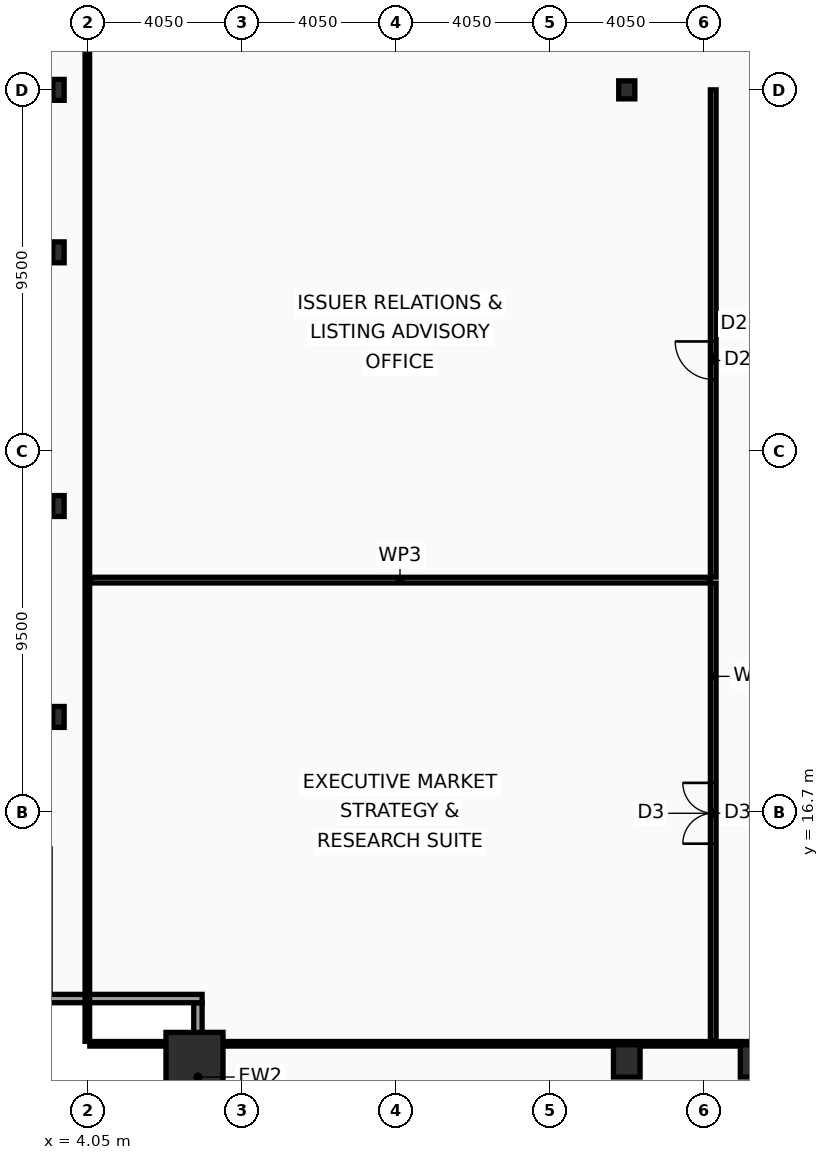
"""IFC4 building model, lengths in metres.
Left out: names, types, materials, properties, quantities, classifications, styles, units other than length and angle.
Written with IfcOpenShell. Run it as: python <this file> out.ifc"""

import sys

from ifc_helpers import new_model, si_unit, direction, frame, frame_2d, origin, origin_2d, place, context, subcontext, project, spatial, rectangle, hollow_rectangle, i_section, extrude, element, fill, save


model = new_model("IFC4")
c1 = context("Model", 3, precision=1e-05, world=origin(), true_north=direction((0.0, 1.0)))
c2 = subcontext(c1, "Body", "Model", "MODEL_VIEW")
j1 = project(units=[si_unit("LENGTHUNIT", "METRE"), si_unit("PLANEANGLEUNIT", "RADIAN")], contexts=[c1])
p1 = place(None, origin())
s1 = spatial("IfcSite", under=j1, at=p1, CompositionType="ELEMENT")
p2 = place(p1, origin())
s2 = spatial("IfcBuilding", under=s1, at=p2, CompositionType="ELEMENT")
p3 = place(p2, frame((0.0, 0.0, 106.6)))
s3 = spatial("IfcBuildingStorey", under=s2, at=p3, CompositionType="ELEMENT", Elevation=106.6)
p4 = place(p3, frame((6.85, 10.15, 0.0), z_axis=(0.0, 0.0, 1.0), x_axis=(1.0, 0.0, 0.0)))
e1 = element("IfcColumn", 1, at=p4, inside=s3, PredefinedType="COLUMN", context=c2, shape_type="SweptSolid", body=[
    extrude(hollow_rectangle(XDim=1.5, YDim=1.5, WallThickness=0.07, at=origin_2d()), origin(), (0.0, 0.0, 1.0), 4.4),
])
for number, where, z_axis, x_axis in (
    (2, (18.225, 10.15, 0.0), (0.0, 0.0, 1.0), (1.0, 0.0, 0.0)),
    (3, (21.562, 10.15, 0.0), (0.0, 0.0, 1.0), (1.0, 0.0, 0.0)),
):
    element("IfcColumn", number, at=place(p3, frame(where, z_axis=z_axis, x_axis=x_axis)), inside=s3, PredefinedType="COLUMN", context=c2, shape_type="SweptSolid", body=[
        extrude(hollow_rectangle(XDim=0.7, YDim=0.85, WallThickness=0.05, at=origin_2d()), origin(), (0.0, 0.0, 1.0), 4.4),
    ])
for number, where, z_axis, x_axis in (
    (4, (3.27, 19.2, 0.0), (0.0, 0.0, 1.0), (1.0, 0.0, 0.0)),
    (5, (3.27, 24.75, 0.0), (0.0, 0.0, 1.0), (1.0, 0.0, 0.0)),
    (6, (3.27, 31.425, 0.0), (0.0, 0.0, 1.0), (1.0, 0.0, 0.0)),
    (7, (3.27, 35.7, 0.0), (0.0, 0.0, 1.0), (1.0, 0.0, 0.0)),
):
    element("IfcColumn", number, at=place(p3, frame(where, z_axis=z_axis, x_axis=x_axis)), inside=s3, PredefinedType="COLUMN", context=c2, shape_type="SweptSolid", body=[
        extrude(i_section(OverallWidth=0.3, OverallDepth=0.55, WebThickness=0.015, FlangeThickness=0.029, at=origin_2d()), origin(), (0.0, 0.0, 1.0), 4.4),
    ])
p5 = place(p3, frame((18.225, 35.7, 0.0), z_axis=(0.0, 0.0, 1.0), x_axis=(1.0, 0.0, 0.0)))
e8 = element("IfcColumn", 8, at=p5, inside=s3, PredefinedType="COLUMN", context=c2, shape_type="SweptSolid", body=[
    extrude(i_section(OverallWidth=0.424, OverallDepth=0.474, WebThickness=0.048, FlangeThickness=0.077, at=origin_2d()), origin(), (0.0, 0.0, 1.0), 4.4),
])
p6 = place(p3, frame((6.94, 7.77, 0.0), z_axis=(0.0, 0.0, 1.0), x_axis=(0.0, 1.0, 0.0)))
e9 = element("IfcWall", 9, at=p6, inside=s3, PredefinedType="SOLIDWALL", context=c2, shape_type="SweptSolid", body=[
    extrude(rectangle(XDim=3.91, YDim=0.22, at=frame_2d((1.955, 0.0))), origin(), (0.0, 0.0, 1.0), 3.63),
])
p7 = place(p3, frame((7.05, 11.79, 0.0), z_axis=(0.0, 0.0, 1.0), x_axis=(-1.0, 0.0, 0.0)))
e10 = element("IfcWall", 10, at=p7, inside=s3, PredefinedType="SOLIDWALL", context=c2, shape_type="SweptSolid", body=[
    extrude(rectangle(XDim=4.22, YDim=0.22, at=frame_2d((2.11, 0.0))), origin(), (0.0, 0.0, 1.0), 3.63),
])
p8 = place(p3, frame((20.5, 10.665, 0.0), z_axis=(0.0, 0.0, 1.0), x_axis=(0.0, 1.0, 0.0)))
e11 = element("IfcWall", 11, at=p8, inside=s3, PredefinedType="PARTITIONING", context=c2, shape_type="SweptSolid", body=[
    extrude(rectangle(XDim=12.055, YDim=0.15, at=frame_2d((6.027, 0.0))), origin(), (0.0, 0.0, 1.0), 3.68),
])
p9 = place(p8, frame((5.2, 0.0, 0.0)))
e12 = element("IfcOpeningElement", 12, at=p9, cuts=e11, PredefinedType="OPENING", context=c2, shape_type="SweptSolid", body=[
    extrude(rectangle(XDim=1.6, YDim=2.15, at=frame_2d((0.8, 1.075))), frame((0.0, 0.085, 0.0), z_axis=(0.0, -1.0, 0.0), x_axis=(1.0, 0.0, 0.0)), (0.0, 0.0, 1.0), 0.17),
])
p10 = place(p3, frame((20.5, 22.88, 0.0), z_axis=(0.0, 0.0, 1.0), x_axis=(0.0, 1.0, 0.0)))
e13 = element("IfcWall", 13, at=p10, inside=s3, PredefinedType="PARTITIONING", context=c2, shape_type="SweptSolid", body=[
    extrude(rectangle(XDim=12.82, YDim=0.15, at=frame_2d((6.41, 0.0))), origin(), (0.0, 0.0, 1.0), 3.68),
])
p11 = place(p10, frame((5.2, 0.0, 0.0)))
e14 = element("IfcOpeningElement", 14, at=p11, cuts=e13, PredefinedType="OPENING", context=c2, shape_type="SweptSolid", body=[
    extrude(rectangle(XDim=1.0, YDim=2.05, at=frame_2d((0.5, 1.025))), frame((0.0, 0.085, 0.0), z_axis=(0.0, -1.0, 0.0), x_axis=(1.0, 0.0, 0.0)), (0.0, 0.0, 1.0), 0.17),
])
p12 = place(p3, frame((4.095, 22.8, 0.0), z_axis=(0.0, 0.0, 1.0), x_axis=(1.0, 0.0, 0.0)))
e15 = element("IfcWall", 15, at=p12, inside=s3, PredefinedType="PARTITIONING", context=c2, shape_type="SweptSolid", body=[
    extrude(rectangle(XDim=16.325, YDim=0.15, at=frame_2d((8.163, 0.0))), origin(), (0.0, 0.0, 1.0), 3.53),
])
p13 = place(p3, frame((4.03, 10.665, 0.0), z_axis=(0.0, 0.0, 1.0), x_axis=(0.0, 1.0, 0.0)))
e16 = element("IfcWall", 16, at=p13, inside=s3, PredefinedType="PARTITIONING", context=c2, shape_type="SweptSolid", body=[
    extrude(rectangle(XDim=42.11, YDim=0.12, at=frame_2d((21.055, 0.0))), origin(), (0.0, 0.0, 1.0), 3.53),
])
p14 = place(p3, frame((4.095, 10.6, 0.0), z_axis=(0.0, 0.0, 1.0), x_axis=(1.0, 0.0, 0.0)))
e17 = element("IfcWall", 17, at=p14, inside=s3, PredefinedType="PARTITIONING", context=c2, shape_type="SweptSolid", body=[
    extrude(rectangle(XDim=64.71, YDim=0.12, at=frame_2d((32.355, 0.0))), origin(), (0.0, 0.0, 1.0), 3.53),
])
p15 = place(p9, origin())
e18 = element("IfcDoor", 18, at=p15, inside=s3, OperationType="DOUBLE_DOOR_SINGLE_SWING", PredefinedType="DOOR", context=c2, shape_type="SweptSolid", body=[
    extrude(rectangle(XDim=1.6, YDim=2.15, at=frame_2d((0.8, 1.075))), frame((0.0, 0.025, 0.0), z_axis=(0.0, -1.0, 0.0), x_axis=(1.0, 0.0, 0.0)), (0.0, 0.0, 1.0), 0.05),
])
fill(e12, e18)
p16 = place(p11, origin())
e19 = element("IfcDoor", 19, at=p16, inside=s3, OperationType="SINGLE_SWING_RIGHT", PredefinedType="DOOR", context=c2, shape_type="SweptSolid", body=[
    extrude(rectangle(XDim=1.0, YDim=2.05, at=frame_2d((0.5, 1.025))), frame((0.0, 0.025, 0.0), z_axis=(0.0, -1.0, 0.0), x_axis=(1.0, 0.0, 0.0)), (0.0, 0.0, 1.0), 0.05),
])
fill(e14, e19)
save(model, sys.argv[1])
